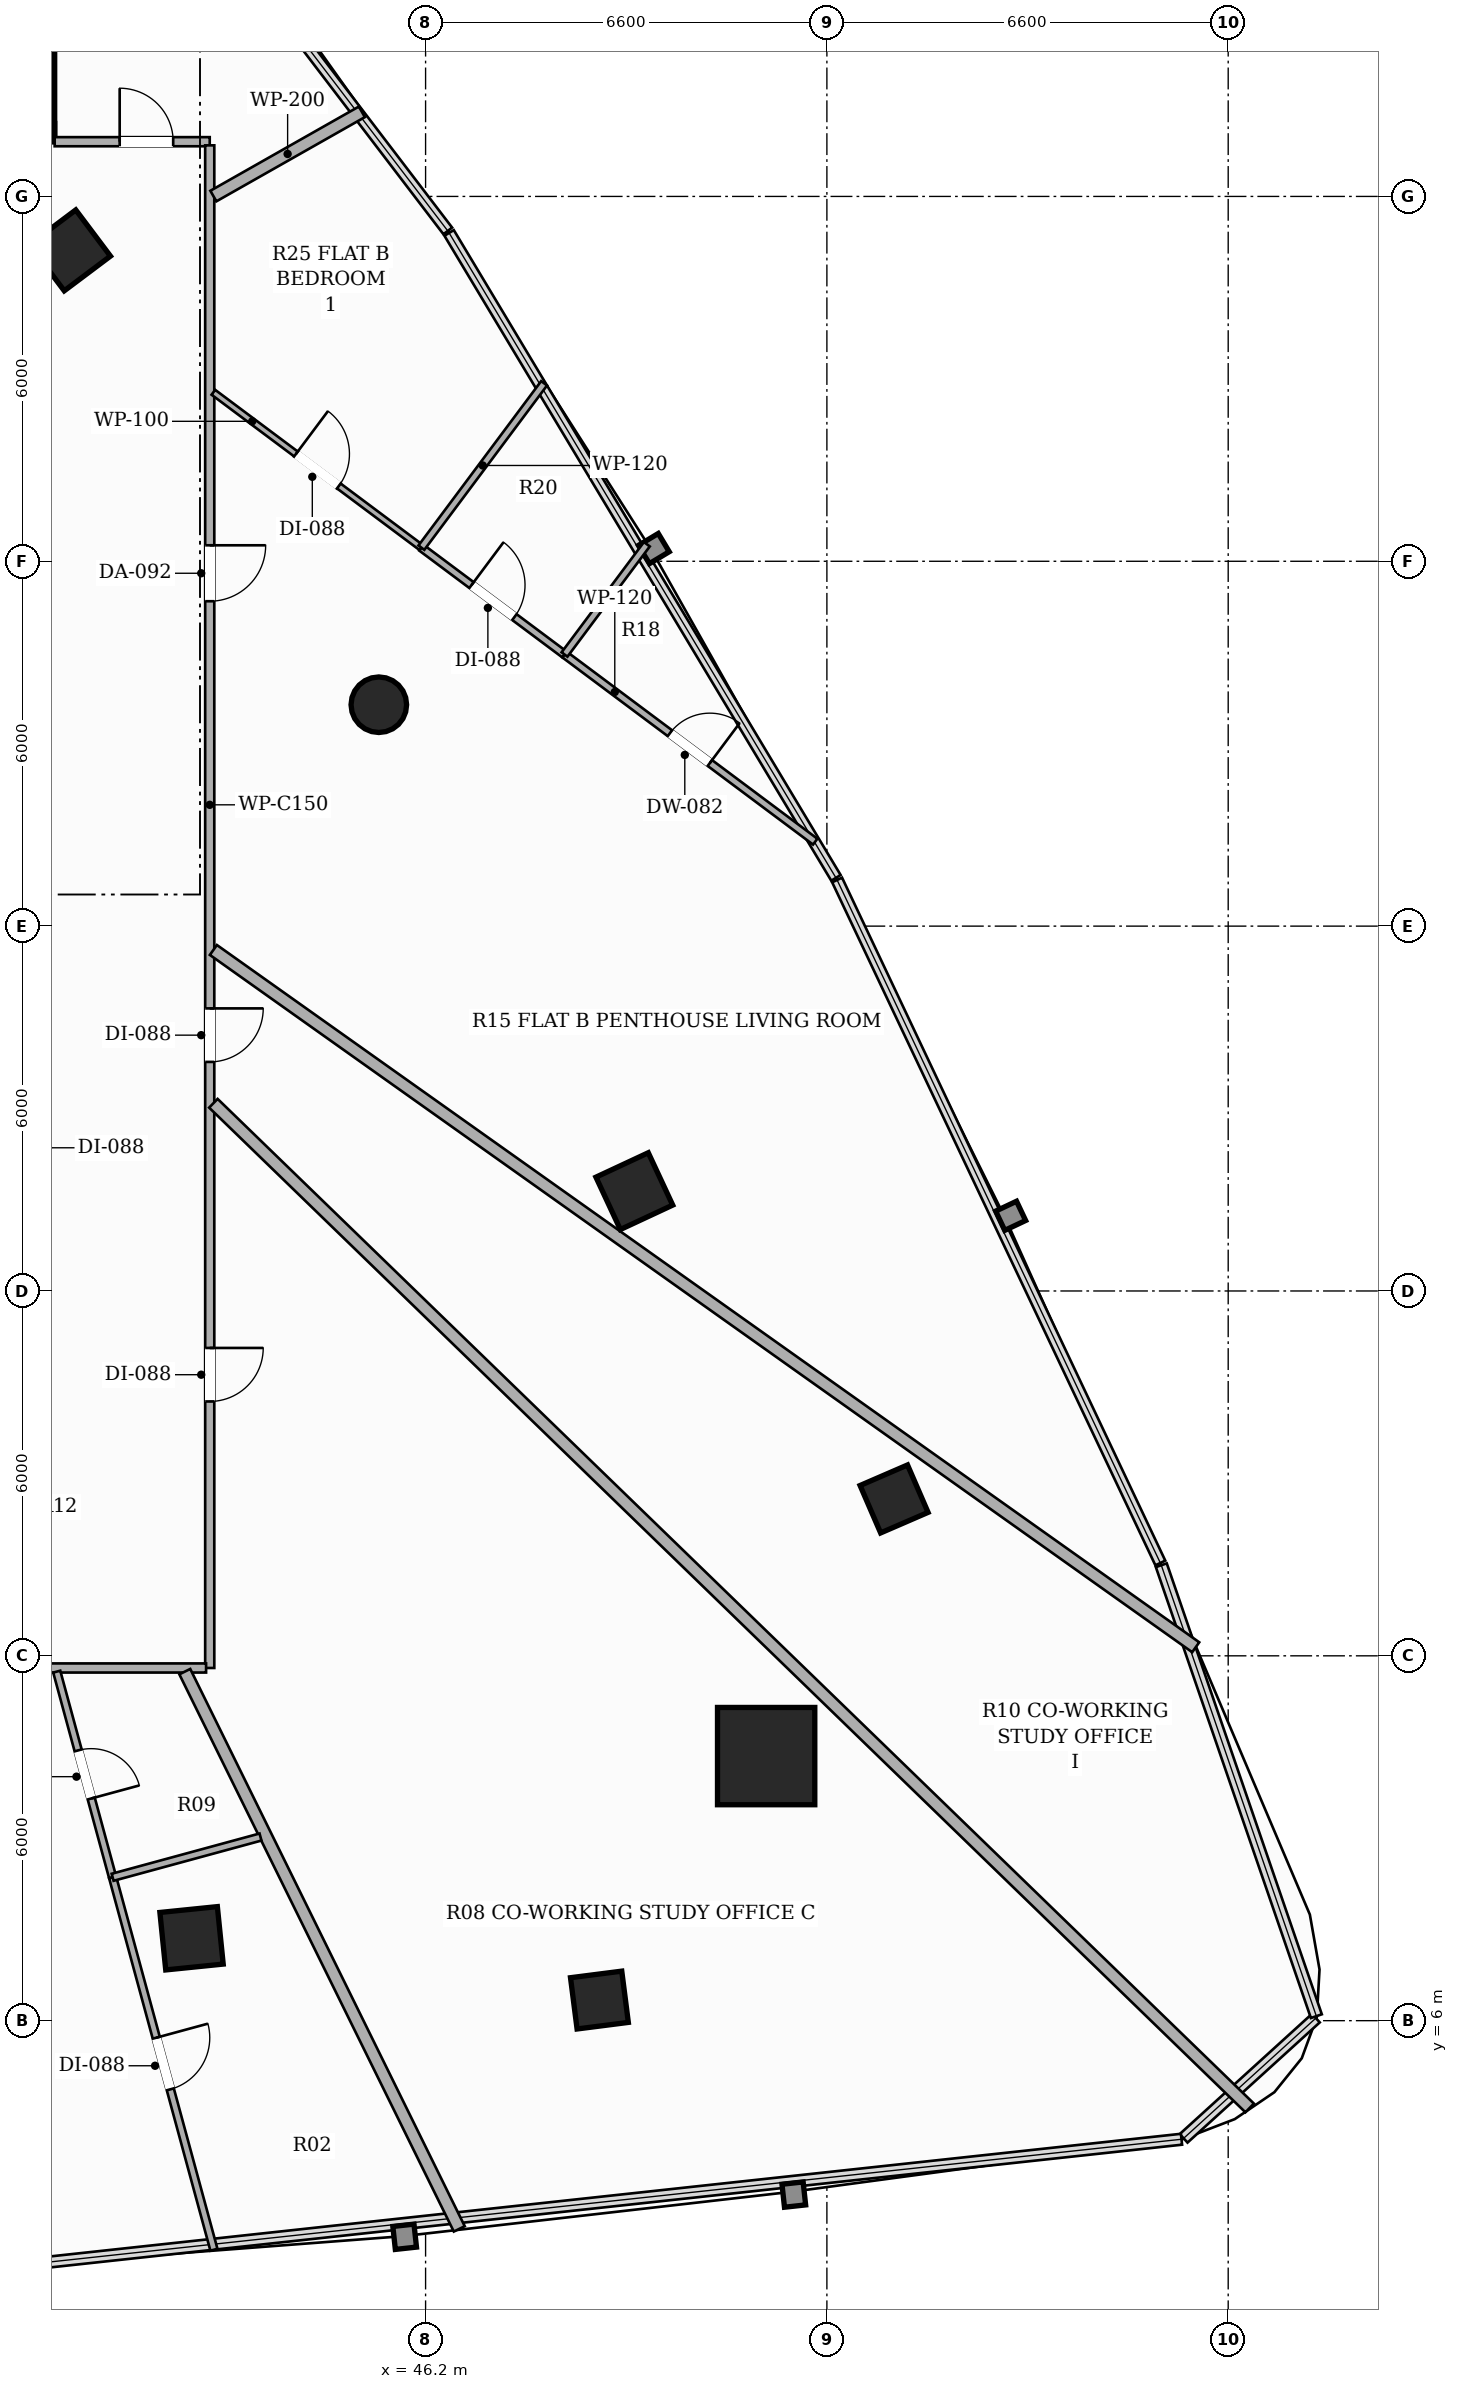
"""IFC4 building model, lengths in metres.
Left out: names, types, materials, properties, quantities, classifications, styles, units other than length and angle.
Written with IfcOpenShell. Run it as: python <this file> out.ifc"""

import sys

from ifc_helpers import new_model, si_unit, direction, frame, frame_2d, origin, origin_2d, place, context, subcontext, project, spatial, rectangle, hollow_rectangle, hollow_circle, extrude, element, fill, save


model = new_model("IFC4")
c1 = context("Model", 3, precision=1e-05, world=origin(), true_north=direction((0.0, 1.0)))
c2 = subcontext(c1, "Body", "Model", "MODEL_VIEW")
j1 = project(units=[si_unit("LENGTHUNIT", "METRE"), si_unit("PLANEANGLEUNIT", "RADIAN")], contexts=[c1])
p1 = place(None, origin())
s1 = spatial("IfcSite", under=j1, at=p1, CompositionType="ELEMENT")
p2 = place(p1, origin())
s2 = spatial("IfcBuilding", under=s1, at=p2, CompositionType="ELEMENT")
p3 = place(p2, frame((0.0, 0.0, 67.55)))
s3 = spatial("IfcBuildingStorey", under=s2, at=p3, CompositionType="ELEMENT", Elevation=67.55)
p4 = place(p3, frame((40.1, 37.05, 0.0), z_axis=(0.0, 0.0, 1.0), x_axis=(-1.0, 0.0, 0.0)))
e1 = element("IfcWall", 1, at=p4, inside=s3, PredefinedType="SHEAR", context=c2, shape_type="SweptSolid", body=[
    extrude(rectangle(XDim=14.2, YDim=0.3, at=frame_2d((7.1, 0.0))), origin(), (0.0, 0.0, 1.0), 3.3),
])
p5 = place(p4, frame((12.325, 0.0, 0.0)))
e2 = element("IfcOpeningElement", 2, at=p5, cuts=e1, PredefinedType="OPENING", context=c2, shape_type="SweptSolid", body=[
    extrude(rectangle(XDim=1.1, YDim=2.2, at=frame_2d((0.55, 1.1))), frame((0.0, 0.16, 0.0), z_axis=(0.0, -1.0, 0.0), x_axis=(1.0, 0.0, 0.0)), (0.0, 0.0, 1.0), 0.32),
])
p6 = place(p4, frame((0.775, 0.0, 0.0)))
e3 = element("IfcOpeningElement", 3, at=p6, cuts=e1, PredefinedType="OPENING", context=c2, shape_type="SweptSolid", body=[
    extrude(rectangle(XDim=1.1, YDim=2.2, at=frame_2d((0.55, 1.1))), frame((0.0, 0.16, 0.0), z_axis=(0.0, -1.0, 0.0), x_axis=(1.0, 0.0, 0.0)), (0.0, 0.0, 1.0), 0.32),
])
p7 = place(p3, frame((39.95, 36.9, 0.0), z_axis=(0.0, 0.0, 1.0), x_axis=(0.0, 1.0, 0.0)))
e4 = element("IfcWall", 4, at=p7, inside=s3, PredefinedType="SHEAR", context=c2, shape_type="SweptSolid", body=[
    extrude(rectangle(XDim=2.85, YDim=0.3, at=frame_2d((1.425, 0.0))), origin(), (0.0, 0.0, 1.0), 3.3),
])
p8 = place(p3, frame((51.801, 10.351, 0.0), z_axis=(0.0, 0.0, 1.0), x_axis=(1.0, 0.0, 0.0)))
e5 = element("IfcColumn", 5, at=p8, inside=s3, PredefinedType="COLUMN", context=c2, shape_type="SweptSolid", body=[
    extrude(hollow_rectangle(XDim=1.6, YDim=1.6, WallThickness=0.05, at=origin_2d()), origin(), (0.0, 0.0, 1.0), 3.3),
])
for number, where, z_axis, x_axis in (
    (6, (42.351, 7.355, 0.0), (0.0, 0.0, 1.0), (0.995, 0.101, 0.0)),
    (7, (49.633, 19.642, 0.0), (0.0, 0.0, 1.0), (-0.423, 0.906, 0.0)),
):
    element("IfcColumn", number, at=place(p3, frame(where, z_axis=z_axis, x_axis=x_axis)), inside=s3, PredefinedType="COLUMN", context=c2, shape_type="SweptSolid", body=[
        extrude(hollow_rectangle(XDim=0.95, YDim=0.95, WallThickness=0.032, at=origin_2d()), origin(), (0.0, 0.0, 1.0), 3.3),
    ])
p9 = place(p3, frame((45.431, 27.641, 0.0), z_axis=(0.0, 0.0, 1.0), x_axis=(1.0, 0.0, 0.0)))
e8 = element("IfcColumn", 8, at=p9, inside=s3, PredefinedType="COLUMN", context=c2, shape_type="SweptSolid", body=[
    extrude(hollow_circle(Radius=0.457, WallThickness=0.025, at=origin_2d()), origin(), (0.0, 0.0, 1.0), 3.3),
])
p10 = place(p3, frame((40.352, 35.113, 0.0), z_axis=(0.0, 0.0, 1.0), x_axis=(-0.600420225326, 0.799684658487, 0.0)))
e9 = element("IfcColumn", 9, at=p10, inside=s3, PredefinedType="COLUMN", context=c2, shape_type="SweptSolid", body=[
    extrude(hollow_rectangle(XDim=0.95, YDim=0.95, WallThickness=0.032, at=origin_2d()), origin(), (0.0, 0.0, 1.0), 3.3),
])
for number, where, z_axis, x_axis in (
    (10, (49.059, 6.339, 0.0), (0.0, 0.0, 1.0), (0.992, 0.127, 0.0)),
    (11, (53.905, 14.58, 0.0), (0.0, 0.0, 1.0), (-0.397, 0.918, 0.0)),
):
    element("IfcColumn", number, at=place(p3, frame(where, z_axis=z_axis, x_axis=x_axis)), inside=s3, PredefinedType="COLUMN", context=c2, shape_type="SweptSolid", body=[
        extrude(hollow_rectangle(XDim=0.85, YDim=0.85, WallThickness=0.028, at=origin_2d()), origin(), (0.0, 0.0, 1.0), 3.3),
    ])
p11 = place(p3, frame((40.1, 36.9, 0.0), z_axis=(0.0, 0.0, 1.0), x_axis=(1.0, 0.0, 0.0)))
e12 = element("IfcWall", 12, at=p11, inside=s3, PredefinedType="PARTITIONING", context=c2, shape_type="SweptSolid", body=[
    extrude(rectangle(XDim=2.55, YDim=0.15, at=frame_2d((1.275, 0.0))), origin(), (0.0, 0.0, 1.0), 2.413),
])
p12 = place(p11, frame((1.069, 0.0, 0.0)))
e13 = element("IfcOpeningElement", 13, at=p12, cuts=e12, PredefinedType="OPENING", context=c2, shape_type="SweptSolid", body=[
    extrude(rectangle(XDim=0.88, YDim=2.1, at=frame_2d((0.44, 1.05))), frame((0.0, 0.085, 0.0), z_axis=(0.0, -1.0, 0.0), x_axis=(1.0, 0.0, 0.0)), (0.0, 0.0, 1.0), 0.17),
])
p13 = place(p3, frame((42.65, 36.84, 0.0), z_axis=(0.0, 0.0, 1.0), x_axis=(0.0, -1.0, 0.0)))
e14 = element("IfcWall", 14, at=p13, inside=s3, PredefinedType="PARTITIONING", context=c2, shape_type="SweptSolid", body=[
    extrude(rectangle(XDim=25.04, YDim=0.15, at=frame_2d((12.52, 0.0))), origin(), (0.0, 0.0, 1.0), 2.413),
])
p14 = place(p13, frame((6.577, 0.0, 0.0)))
e15 = element("IfcOpeningElement", 15, at=p14, cuts=e14, PredefinedType="OPENING", context=c2, shape_type="SweptSolid", body=[
    extrude(rectangle(XDim=0.92, YDim=2.15, at=frame_2d((0.46, 1.075))), frame((0.0, 0.085, 0.0), z_axis=(0.0, -1.0, 0.0), x_axis=(1.0, 0.0, 0.0)), (0.0, 0.0, 1.0), 0.17),
])
p15 = place(p13, frame((19.777, 0.0, 0.0)))
e16 = element("IfcOpeningElement", 16, at=p15, cuts=e14, PredefinedType="OPENING", context=c2, shape_type="SweptSolid", body=[
    extrude(rectangle(XDim=0.88, YDim=2.1, at=frame_2d((0.44, 1.05))), frame((0.0, 0.085, 0.0), z_axis=(0.0, -1.0, 0.0), x_axis=(1.0, 0.0, 0.0)), (0.0, 0.0, 1.0), 0.17),
])
p16 = place(p13, frame((14.193, 0.0, 0.0)))
e17 = element("IfcOpeningElement", 17, at=p16, cuts=e14, PredefinedType="OPENING", context=c2, shape_type="SweptSolid", body=[
    extrude(rectangle(XDim=0.88, YDim=2.1, at=frame_2d((0.44, 1.05))), frame((0.0, 0.085, 0.0), z_axis=(0.0, -1.0, 0.0), x_axis=(1.0, 0.0, 0.0)), (0.0, 0.0, 1.0), 0.17),
])
p17 = place(p3, frame((42.59, 11.8, 0.0), z_axis=(0.0, 0.0, 1.0), x_axis=(-1.0, 0.0, 0.0)))
e18 = element("IfcWall", 18, at=p17, inside=s3, PredefinedType="PARTITIONING", context=c2, shape_type="SweptSolid", body=[
    extrude(rectangle(XDim=19.24, YDim=0.15, at=frame_2d((9.62, 0.0))), origin(), (0.0, 0.0, 1.0), 2.669),
])
p18 = place(p17, frame((11.489, 0.0, 0.0)))
e19 = element("IfcOpeningElement", 19, at=p18, cuts=e18, PredefinedType="OPENING", context=c2, shape_type="SweptSolid", body=[
    extrude(rectangle(XDim=0.92, YDim=2.15, at=frame_2d((0.46, 1.075))), frame((0.0, 0.085, 0.0), z_axis=(0.0, -1.0, 0.0), x_axis=(1.0, 0.0, 0.0)), (0.0, 0.0, 1.0), 0.17),
])
p19 = place(p17, frame((3.787, 0.0, 0.0)))
e20 = element("IfcOpeningElement", 20, at=p19, cuts=e18, PredefinedType="OPENING", context=c2, shape_type="SweptSolid", body=[
    extrude(rectangle(XDim=0.92, YDim=2.15, at=frame_2d((0.46, 1.075))), frame((0.0, 0.085, 0.0), z_axis=(0.0, -1.0, 0.0), x_axis=(1.0, 0.0, 0.0)), (0.0, 0.0, 1.0), 0.17),
])
p20 = place(p3, frame((45.152, 37.391, 0.0), z_axis=(0.0, 0.0, 1.0), x_axis=(-0.86984931175, -0.4933175193, 0.0)))
e21 = element("IfcWall", 21, at=p20, inside=s3, PredefinedType="PARTITIONING", context=c2, shape_type="SweptSolid", body=[
    extrude(rectangle(XDim=2.808, YDim=0.2, at=frame_2d((1.404, 0.0))), origin(), (0.0, 0.0, 1.0), 2.619),
])
p21 = place(p3, frame((58.866, 12.141, 0.0), z_axis=(0.0, 0.0, 1.0), x_axis=(-0.815477500133, 0.578788775614, 0.0)))
e22 = element("IfcWall", 22, at=p21, inside=s3, PredefinedType="PARTITIONING", context=c2, shape_type="SweptSolid", body=[
    extrude(rectangle(XDim=19.812, YDim=0.2, at=frame_2d((9.906, 0.0))), origin(), (0.0, 0.0, 1.0), 2.413),
])
p22 = place(p3, frame((46.754, 2.576, 0.0), z_axis=(0.0, 0.0, 1.0), x_axis=(-0.441871352221, 0.897078429172, 0.0)))
e23 = element("IfcWall", 23, at=p22, inside=s3, PredefinedType="PARTITIONING", context=c2, shape_type="SweptSolid", body=[
    extrude(rectangle(XDim=10.215, YDim=0.2, at=frame_2d((5.108, 0.0))), origin(), (0.0, 0.0, 1.0), 2.413),
])
p23 = place(p3, frame((42.71, 21.087, 0.0), z_axis=(0.0, 0.0, 1.0), x_axis=(0.717996025824, -0.696047201633, 0.0)))
e24 = element("IfcWall", 24, at=p23, inside=s3, PredefinedType="PARTITIONING", context=c2, shape_type="SweptSolid", body=[
    extrude(rectangle(XDim=23.737, YDim=0.2, at=frame_2d((11.868, 0.0))), origin(), (0.0, 0.0, 1.0), 2.413),
])
p24 = place(p3, frame((48.485, 28.467, 0.0), z_axis=(0.0, 0.0, 1.0), x_axis=(0.80130205943, -0.598259984917, 0.0)))
e25 = element("IfcWall", 25, at=p24, inside=s3, PredefinedType="PARTITIONING", context=c2, shape_type="SweptSolid", body=[
    extrude(rectangle(XDim=5.145, YDim=0.12, at=frame_2d((2.573, 0.0))), origin(), (0.0, 0.0, 1.0), 3.06),
])
p25 = place(p24, frame((2.163, 0.0, 0.0)))
e26 = element("IfcOpeningElement", 26, at=p25, cuts=e25, PredefinedType="OPENING", context=c2, shape_type="SweptSolid", body=[
    extrude(rectangle(XDim=0.82, YDim=2.1, at=frame_2d((0.41, 1.05))), frame((0.0, 0.07, 0.0), z_axis=(0.0, -1.0, 0.0), x_axis=(1.0, 0.0, 0.0)), (0.0, 0.0, 1.0), 0.14),
])
p26 = place(p3, frame((46.131, 30.224, 0.0), z_axis=(0.0, 0.0, 1.0), x_axis=(0.801374244223, -0.598163289325, 0.0)))
e27 = element("IfcWall", 27, at=p26, inside=s3, PredefinedType="PARTITIONING", context=c2, shape_type="SweptSolid", body=[
    extrude(rectangle(XDim=2.938, YDim=0.12, at=frame_2d((1.469, 0.0))), origin(), (0.0, 0.0, 1.0), 3.06),
])
p27 = place(p26, frame((1.029, 0.0, 0.0)))
e28 = element("IfcOpeningElement", 28, at=p27, cuts=e27, PredefinedType="OPENING", context=c2, shape_type="SweptSolid", body=[
    extrude(rectangle(XDim=0.88, YDim=2.1, at=frame_2d((0.44, 1.05))), frame((0.0, 0.07, 0.0), z_axis=(0.0, -1.0, 0.0), x_axis=(1.0, 0.0, 0.0)), (0.0, 0.0, 1.0), 0.14),
])
p28 = place(p3, frame((42.71, 32.779, 0.0), z_axis=(0.0, 0.0, 1.0), x_axis=(0.801226493917, -0.598361183104, 0.0)))
e29 = element("IfcWall", 29, at=p28, inside=s3, PredefinedType="PARTITIONING", context=c2, shape_type="SweptSolid", body=[
    extrude(rectangle(XDim=4.27, YDim=0.1, at=frame_2d((2.135, 0.0))), origin(), (0.0, 0.0, 1.0), 3.06),
])
p29 = place(p28, frame((1.695, 0.0, 0.0)))
e30 = element("IfcOpeningElement", 30, at=p29, cuts=e29, PredefinedType="OPENING", context=c2, shape_type="SweptSolid", body=[
    extrude(rectangle(XDim=0.88, YDim=2.1, at=frame_2d((0.44, 1.05))), frame((0.0, 0.06, 0.0), z_axis=(0.0, -1.0, 0.0), x_axis=(1.0, 0.0, 0.0)), (0.0, 0.0, 1.0), 0.12),
])
p30 = place(p3, frame((48.485, 28.467, 0.0), z_axis=(0.0, 0.0, 1.0), x_axis=(0.59837605097, 0.801215390282, 0.0)))
e31 = element("IfcWall", 31, at=p30, inside=s3, PredefinedType="PARTITIONING", context=c2, shape_type="SweptSolid", body=[
    extrude(rectangle(XDim=2.263, YDim=0.12, at=frame_2d((1.131, 0.0))), origin(), (0.0, 0.0, 1.0), 3.06),
])
p31 = place(p3, frame((46.131, 30.224, 0.0), z_axis=(0.0, 0.0, 1.0), x_axis=(0.598226648312, 0.801326947787, 0.0)))
e32 = element("IfcWall", 32, at=p31, inside=s3, PredefinedType="PARTITIONING", context=c2, shape_type="SweptSolid", body=[
    extrude(rectangle(XDim=3.373, YDim=0.12, at=frame_2d((1.687, 0.0))), origin(), (0.0, 0.0, 1.0), 3.06),
])
p32 = place(p3, frame((40.134, 11.74, 0.0), z_axis=(0.0, 0.0, 1.0), x_axis=(0.262203658207, -0.965012560345, 0.0)))
e33 = element("IfcWall", 33, at=p32, inside=s3, PredefinedType="PARTITIONING", context=c2, shape_type="SweptSolid", body=[
    extrude(rectangle(XDim=3.505, YDim=0.12, at=frame_2d((1.752, 0.0))), origin(), (0.0, 0.0, 1.0), 3.06),
])
p33 = place(p32, frame((1.342, 0.0, 0.0)))
e34 = element("IfcOpeningElement", 34, at=p33, cuts=e33, PredefinedType="OPENING", context=c2, shape_type="SweptSolid", body=[
    extrude(rectangle(XDim=0.82, YDim=2.1, at=frame_2d((0.41, 1.05))), frame((0.0, 0.07, 0.0), z_axis=(0.0, -1.0, 0.0), x_axis=(1.0, 0.0, 0.0)), (0.0, 0.0, 1.0), 0.14),
])
p34 = place(p3, frame((41.053, 8.358, 0.0), z_axis=(0.0, 0.0, 1.0), x_axis=(0.262466446164, -0.964941119778, 0.0)))
e35 = element("IfcWall", 35, at=p34, inside=s3, PredefinedType="PARTITIONING", context=c2, shape_type="SweptSolid", body=[
    extrude(rectangle(XDim=6.348, YDim=0.12, at=frame_2d((3.174, 0.0))), origin(), (0.0, 0.0, 1.0), 2.413),
])
p35 = place(p34, frame((2.734, 0.0, 0.0)))
e36 = element("IfcOpeningElement", 36, at=p35, cuts=e35, PredefinedType="OPENING", context=c2, shape_type="SweptSolid", body=[
    extrude(rectangle(XDim=0.88, YDim=2.1, at=frame_2d((0.44, 1.05))), frame((0.0, 0.07, 0.0), z_axis=(0.0, -1.0, 0.0), x_axis=(1.0, 0.0, 0.0)), (0.0, 0.0, 1.0), 0.14),
])
p36 = place(p3, frame((43.485, 9.02, 0.0), z_axis=(0.0, 0.0, 1.0), x_axis=(-0.964884417827, -0.262674818425, 0.0)))
e37 = element("IfcWall", 37, at=p36, inside=s3, PredefinedType="PARTITIONING", context=c2, shape_type="SweptSolid", body=[
    extrude(rectangle(XDim=2.521, YDim=0.12, at=frame_2d((1.26, 0.0))), origin(), (0.0, 0.0, 1.0), 2.669),
])
p37 = place(p12, origin())
e38 = element("IfcDoor", 38, at=p37, inside=s3, OperationType="SINGLE_SWING_LEFT", PredefinedType="DOOR", context=c2, shape_type="SweptSolid", body=[
    extrude(rectangle(XDim=0.88, YDim=2.1, at=frame_2d((0.44, 1.05))), frame((0.0, 0.025, 0.0), z_axis=(0.0, -1.0, 0.0), x_axis=(1.0, 0.0, 0.0)), (0.0, 0.0, 1.0), 0.05),
])
fill(e13, e38)
p38 = place(p14, origin())
e39 = element("IfcDoor", 39, at=p38, inside=s3, OperationType="SINGLE_SWING_LEFT", PredefinedType="DOOR", context=c2, shape_type="SweptSolid", body=[
    extrude(rectangle(XDim=0.92, YDim=2.15, at=frame_2d((0.46, 1.075))), frame((0.0, 0.025, 0.0), z_axis=(0.0, -1.0, 0.0), x_axis=(1.0, 0.0, 0.0)), (0.0, 0.0, 1.0), 0.05),
])
fill(e15, e39)
p39 = place(p25, origin())
e40 = element("IfcDoor", 40, at=p39, inside=s3, OperationType="SINGLE_SWING_RIGHT", PredefinedType="DOOR", context=c2, shape_type="SweptSolid", body=[
    extrude(rectangle(XDim=0.82, YDim=2.1, at=frame_2d((0.41, 1.05))), frame((0.0, 0.025, 0.0), z_axis=(0.0, -1.0, 0.0), x_axis=(1.0, 0.0, 0.0)), (0.0, 0.0, 1.0), 0.05),
])
fill(e26, e40)
p40 = place(p27, origin())
e41 = element("IfcDoor", 41, at=p40, inside=s3, OperationType="SINGLE_SWING_LEFT", PredefinedType="DOOR", context=c2, shape_type="SweptSolid", body=[
    extrude(rectangle(XDim=0.88, YDim=2.1, at=frame_2d((0.44, 1.05))), frame((0.0, 0.025, 0.0), z_axis=(0.0, -1.0, 0.0), x_axis=(1.0, 0.0, 0.0)), (0.0, 0.0, 1.0), 0.05),
])
fill(e28, e41)
p41 = place(p29, origin())
e42 = element("IfcDoor", 42, at=p41, inside=s3, OperationType="SINGLE_SWING_LEFT", PredefinedType="DOOR", context=c2, shape_type="SweptSolid", body=[
    extrude(rectangle(XDim=0.88, YDim=2.1, at=frame_2d((0.44, 1.05))), frame((0.0, 0.025, 0.0), z_axis=(0.0, -1.0, 0.0), x_axis=(1.0, 0.0, 0.0)), (0.0, 0.0, 1.0), 0.05),
])
fill(e30, e42)
p42 = place(p15, origin())
e43 = element("IfcDoor", 43, at=p42, inside=s3, OperationType="SINGLE_SWING_LEFT", PredefinedType="DOOR", context=c2, shape_type="SweptSolid", body=[
    extrude(rectangle(XDim=0.88, YDim=2.1, at=frame_2d((0.44, 1.05))), frame((0.0, 0.025, 0.0), z_axis=(0.0, -1.0, 0.0), x_axis=(1.0, 0.0, 0.0)), (0.0, 0.0, 1.0), 0.05),
])
fill(e16, e43)
p43 = place(p33, origin())
e44 = element("IfcDoor", 44, at=p43, inside=s3, OperationType="SINGLE_SWING_RIGHT", PredefinedType="DOOR", context=c2, shape_type="SweptSolid", body=[
    extrude(rectangle(XDim=0.82, YDim=2.1, at=frame_2d((0.41, 1.05))), frame((0.0, 0.025, 0.0), z_axis=(0.0, -1.0, 0.0), x_axis=(1.0, 0.0, 0.0)), (0.0, 0.0, 1.0), 0.05),
])
fill(e34, e44)
p44 = place(p35, origin())
e45 = element("IfcDoor", 45, at=p44, inside=s3, OperationType="SINGLE_SWING_LEFT", PredefinedType="DOOR", context=c2, shape_type="SweptSolid", body=[
    extrude(rectangle(XDim=0.88, YDim=2.1, at=frame_2d((0.44, 1.05))), frame((0.0, 0.025, 0.0), z_axis=(0.0, -1.0, 0.0), x_axis=(1.0, 0.0, 0.0)), (0.0, 0.0, 1.0), 0.05),
])
fill(e36, e45)
p45 = place(p16, origin())
e46 = element("IfcDoor", 46, at=p45, inside=s3, OperationType="SINGLE_SWING_LEFT", PredefinedType="DOOR", context=c2, shape_type="SweptSolid", body=[
    extrude(rectangle(XDim=0.88, YDim=2.1, at=frame_2d((0.44, 1.05))), frame((0.0, 0.025, 0.0), z_axis=(0.0, -1.0, 0.0), x_axis=(1.0, 0.0, 0.0)), (0.0, 0.0, 1.0), 0.05),
])
fill(e17, e46)
save(model, sys.argv[1])
